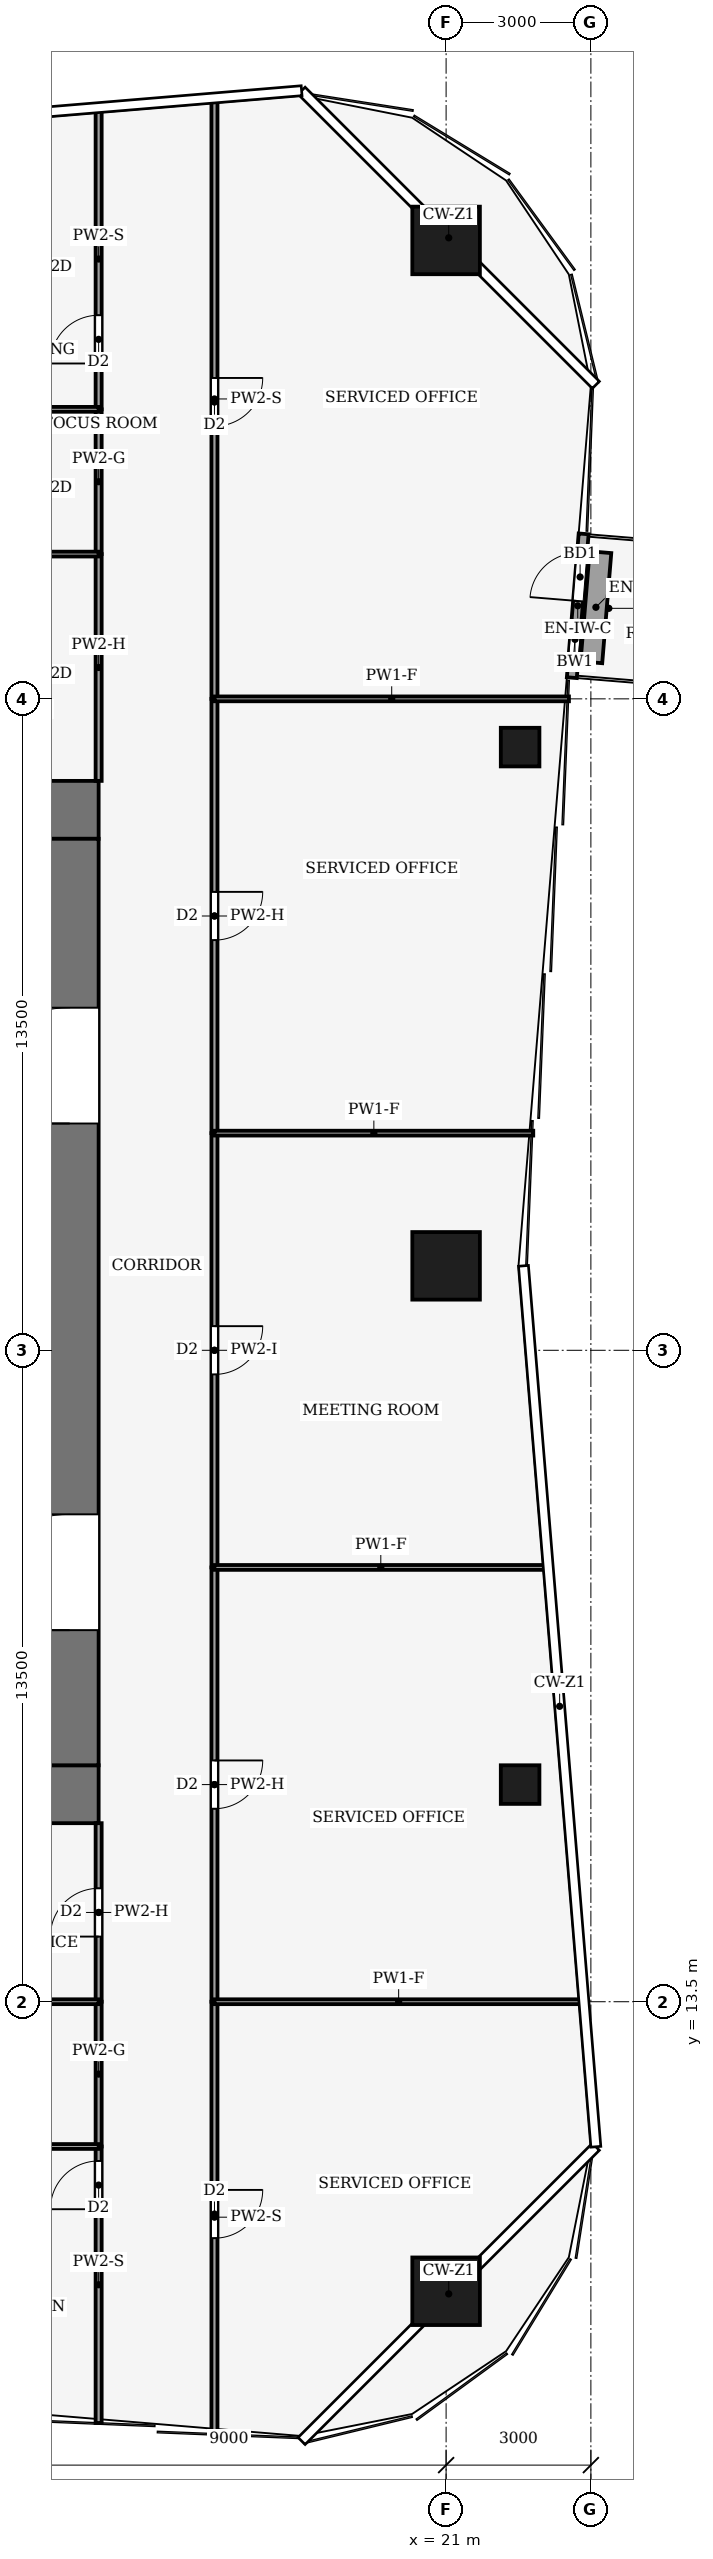
"""IFC4 building model, lengths in metres.
Left out: names, types, materials, properties, quantities, classifications, styles, units other than length and angle.
Written with IfcOpenShell. Run it as: python <this file> out.ifc"""

import sys

from ifc_helpers import new_model, si_unit, direction, frame, frame_2d, origin, origin_2d, place, context, subcontext, project, spatial, rectangle, hollow_rectangle, extrude, element, fill, save


model = new_model("IFC4")
c1 = context("Model", 3, precision=1e-05, world=origin(), true_north=direction((0.0, 1.0)))
c2 = subcontext(c1, "Body", "Model", "MODEL_VIEW")
j1 = project(units=[si_unit("LENGTHUNIT", "METRE"), si_unit("PLANEANGLEUNIT", "RADIAN")], contexts=[c1])
p1 = place(None, origin())
s1 = spatial("IfcSite", under=j1, at=p1, CompositionType="ELEMENT")
p2 = place(p1, origin())
s2 = spatial("IfcBuilding", under=s1, at=p2, CompositionType="ELEMENT")
p3 = place(p2, frame((0.0, 0.0, 98.0)))
s3 = spatial("IfcBuildingStorey", under=s2, at=p3, CompositionType="ELEMENT", Elevation=98.0)
for number, where, z_axis, x_axis in (
    (1, (-13.8, 17.8, -0.13), (0.0, 0.0, 1.0), (1.0, 0.0, 0.0)),
    (2, (-13.8, 38.2, -0.13), (0.0, 0.0, 1.0), (1.0, 0.0, 0.0)),
):
    element("IfcWall", number, at=place(p3, frame(where, z_axis=z_axis, x_axis=x_axis)), inside=s3, PredefinedType="SHEAR", context=c2, shape_type="SweptSolid", body=[
        extrude(rectangle(XDim=27.6, YDim=1.2, at=frame_2d((13.8, 0.0))), origin(), (0.0, 0.0, 1.0), 4.0),
    ])
p4 = place(p3, frame((13.2, 18.4, -0.13), z_axis=(0.0, 0.0, 1.0), x_axis=(0.0, 1.0, 0.0)))
e3 = element("IfcWall", 3, at=p4, inside=s3, PredefinedType="SHEAR", context=c2, shape_type="SweptSolid", body=[
    extrude(rectangle(XDim=19.2, YDim=1.2, at=frame_2d((9.6, 0.0))), origin(), (0.0, 0.0, 1.0), 4.0),
])
p5 = place(p4, frame((2.8, 0.0, 0.13)))
e4 = element("IfcOpeningElement", 4, at=p5, cuts=e3, PredefinedType="OPENING", context=c2, shape_type="SweptSolid", body=[
    extrude(rectangle(XDim=2.4, YDim=2.4, at=frame_2d((1.2, 1.2))), frame((0.0, 0.61, 0.0), z_axis=(0.0, -1.0, 0.0), x_axis=(1.0, 0.0, 0.0)), (0.0, 0.0, 1.0), 1.22),
])
p6 = place(p4, frame((13.3, 0.0, 0.13)))
e5 = element("IfcOpeningElement", 5, at=p6, cuts=e3, PredefinedType="OPENING", context=c2, shape_type="SweptSolid", body=[
    extrude(rectangle(XDim=2.4, YDim=2.4, at=frame_2d((1.2, 1.2))), frame((0.0, 0.61, 0.0), z_axis=(0.0, -1.0, 0.0), x_axis=(1.0, 0.0, 0.0)), (0.0, 0.0, 1.0), 1.22),
])
for number, where, z_axis, x_axis in (
    (6, (21.0, 50.0, 0.0), (0.0, 0.0, 1.0), (1.0, 0.0, 0.0)),
    (7, (21.0, 28.75, 0.0), (0.0, 0.0, 1.0), (1.0, 0.0, 0.0)),
    (8, (21.0, 7.5, 0.0), (0.0, 0.0, 1.0), (1.0, 0.0, 0.0)),
):
    element("IfcColumn", number, at=place(p3, frame(where, z_axis=z_axis, x_axis=x_axis)), inside=s3, PredefinedType="COLUMN", context=c2, shape_type="SweptSolid", body=[
        extrude(hollow_rectangle(XDim=1.4, YDim=1.4, WallThickness=0.08, at=origin_2d()), origin(), (0.0, 0.0, 1.0), 4.0),
    ])
for number, where, z_axis, x_axis in (
    (9, (22.534, 18.0, 0.0), (0.0, 0.0, 1.0), (1.0, 0.0, 0.0)),
    (10, (22.534, 39.5, 0.0), (0.0, 0.0, 1.0), (1.0, 0.0, 0.0)),
):
    element("IfcColumn", number, at=place(p3, frame(where, z_axis=z_axis, x_axis=x_axis)), inside=s3, PredefinedType="COLUMN", context=c2, shape_type="SweptSolid", body=[
        extrude(hollow_rectangle(XDim=0.8, YDim=0.8, WallThickness=0.04, at=origin_2d()), origin(), (0.0, 0.0, 1.0), 4.0),
    ])
p7 = place(p3, frame((23.605, 40.939, 0.0), z_axis=(0.0, 0.0, 1.0), x_axis=(0.081903334605, 0.996640278024, 0.0)))
e11 = element("IfcWall", 11, at=p7, inside=s3, PredefinedType="SOLIDWALL", context=c2, shape_type="SweptSolid", body=[
    extrude(rectangle(XDim=2.99, YDim=0.206, at=frame_2d((1.495, 0.0))), origin(), (0.0, 0.0, 1.0), 3.65),
])
p8 = place(p7, frame((1.593, 0.0, 0.0)))
e12 = element("IfcOpeningElement", 12, at=p8, cuts=e11, PredefinedType="OPENING", context=c2, shape_type="SweptSolid", body=[
    extrude(rectangle(XDim=1.0, YDim=2.1, at=frame_2d((0.5, 1.05))), frame((0.0, 0.113, 0.0), z_axis=(0.0, -1.0, 0.0), x_axis=(1.0, 0.0, 0.0)), (0.0, 0.0, 1.0), 0.226),
])
p9 = place(p7, frame((0.396, 0.0, 0.9)))
e13 = element("IfcOpeningElement", 13, at=p9, cuts=e11, PredefinedType="OPENING", context=c2, shape_type="SweptSolid", body=[
    extrude(rectangle(XDim=0.8, YDim=1.2, at=frame_2d((0.4, 0.6))), frame((0.0, 0.113, 0.0), z_axis=(0.0, -1.0, 0.0), x_axis=(1.0, 0.0, 0.0)), (0.0, 0.0, 1.0), 0.226),
])
p10 = place(p3, frame((24.01, 41.257, 0.0), z_axis=(0.0, 0.0, 1.0), x_axis=(0.081986639556, 0.996633428566, 0.0)))
e14 = element("IfcWall", 14, at=p10, inside=s3, PredefinedType="USERDEFINED", context=c2, shape_type="SweptSolid", body=[
    extrude(rectangle(XDim=2.29, YDim=0.45, at=frame_2d((1.145, 0.0))), origin(), (0.0, 0.0, 1.0), 0.4),
])
p11 = place(p3, frame((16.2, 13.5, 0.0), z_axis=(0.0, 0.0, 1.0), x_axis=(0.0, -1.0, 0.0)))
e15 = element("IfcWall", 15, at=p11, inside=s3, PredefinedType="PARTITIONING", context=c2, shape_type="SweptSolid", body=[
    extrude(rectangle(XDim=8.93, YDim=0.125, at=frame_2d((4.465, 0.0))), origin(), (0.0, 0.0, 1.0), 3.04),
])
p12 = place(p11, frame((3.9, 0.0, 0.0)))
e16 = element("IfcOpeningElement", 16, at=p12, cuts=e15, PredefinedType="OPENING", context=c2, shape_type="SweptSolid", body=[
    extrude(rectangle(XDim=1.0, YDim=2.1, at=frame_2d((0.5, 1.05))), frame((0.0, 0.073, 0.0), z_axis=(0.0, -1.0, 0.0), x_axis=(1.0, 0.0, 0.0)), (0.0, 0.0, 1.0), 0.145),
])
p13 = place(p3, frame((16.2, 22.5, 0.0), z_axis=(0.0, 0.0, 1.0), x_axis=(0.0, -1.0, 0.0)))
e17 = element("IfcWall", 17, at=p13, inside=s3, PredefinedType="PARTITIONING", context=c2, shape_type="SweptSolid", body=[
    extrude(rectangle(XDim=9.0, YDim=0.125, at=frame_2d((4.5, 0.0))), origin(), (0.0, 0.0, 1.0), 3.14),
])
p14 = place(p13, frame((4.0, 0.0, 0.0)))
e18 = element("IfcOpeningElement", 18, at=p14, cuts=e17, PredefinedType="OPENING", context=c2, shape_type="SweptSolid", body=[
    extrude(rectangle(XDim=1.0, YDim=2.1, at=frame_2d((0.5, 1.05))), frame((0.0, 0.073, 0.0), z_axis=(0.0, -1.0, 0.0), x_axis=(1.0, 0.0, 0.0)), (0.0, 0.0, 1.0), 0.145),
])
p15 = place(p3, frame((16.2, 31.5, 0.0), z_axis=(0.0, 0.0, 1.0), x_axis=(0.0, -1.0, 0.0)))
e19 = element("IfcWall", 19, at=p15, inside=s3, PredefinedType="PARTITIONING", context=c2, shape_type="SweptSolid", body=[
    extrude(rectangle(XDim=9.0, YDim=0.125, at=frame_2d((4.5, 0.0))), origin(), (0.0, 0.0, 1.0), 3.48),
])
p16 = place(p15, frame((4.0, 0.0, 0.0)))
e20 = element("IfcOpeningElement", 20, at=p16, cuts=e19, PredefinedType="OPENING", context=c2, shape_type="SweptSolid", body=[
    extrude(rectangle(XDim=1.0, YDim=2.1, at=frame_2d((0.5, 1.05))), frame((0.0, 0.073, 0.0), z_axis=(0.0, -1.0, 0.0), x_axis=(1.0, 0.0, 0.0)), (0.0, 0.0, 1.0), 0.145),
])
p17 = place(p3, frame((16.2, 40.5, 0.0), z_axis=(0.0, 0.0, 1.0), x_axis=(0.0, -1.0, 0.0)))
e21 = element("IfcWall", 21, at=p17, inside=s3, PredefinedType="PARTITIONING", context=c2, shape_type="SweptSolid", body=[
    extrude(rectangle(XDim=9.0, YDim=0.125, at=frame_2d((4.5, 0.0))), origin(), (0.0, 0.0, 1.0), 3.14),
])
p18 = place(p17, frame((4.0, 0.0, 0.0)))
e22 = element("IfcOpeningElement", 22, at=p18, cuts=e21, PredefinedType="OPENING", context=c2, shape_type="SweptSolid", body=[
    extrude(rectangle(XDim=1.0, YDim=2.1, at=frame_2d((0.5, 1.05))), frame((0.0, 0.073, 0.0), z_axis=(0.0, -1.0, 0.0), x_axis=(1.0, 0.0, 0.0)), (0.0, 0.0, 1.0), 0.145),
])
p19 = place(p3, frame((16.2, 52.93, 0.0), z_axis=(0.0, 0.0, 1.0), x_axis=(0.0, -1.0, 0.0)))
e23 = element("IfcWall", 23, at=p19, inside=s3, PredefinedType="PARTITIONING", context=c2, shape_type="SweptSolid", body=[
    extrude(rectangle(XDim=12.43, YDim=0.125, at=frame_2d((6.215, 0.0))), origin(), (0.0, 0.0, 1.0), 3.04),
])
p20 = place(p19, frame((5.78, 0.0, 0.0)))
e24 = element("IfcOpeningElement", 24, at=p20, cuts=e23, PredefinedType="OPENING", context=c2, shape_type="SweptSolid", body=[
    extrude(rectangle(XDim=1.0, YDim=2.1, at=frame_2d((0.5, 1.05))), frame((0.0, 0.073, 0.0), z_axis=(0.0, -1.0, 0.0), x_axis=(1.0, 0.0, 0.0)), (0.0, 0.0, 1.0), 0.145),
])
p21 = place(p3, frame((13.8, 4.77, 0.0), z_axis=(0.0, 0.0, 1.0), x_axis=(0.0, 1.0, 0.0)))
e25 = element("IfcWall", 25, at=p21, inside=s3, PredefinedType="PARTITIONING", context=c2, shape_type="SweptSolid", body=[
    extrude(rectangle(XDim=5.73, YDim=0.125, at=frame_2d((2.865, 0.0))), origin(), (0.0, 0.0, 1.0), 3.04),
])
p22 = place(p21, frame((4.43, 0.0, 0.0)))
e26 = element("IfcOpeningElement", 26, at=p22, cuts=e25, PredefinedType="OPENING", context=c2, shape_type="SweptSolid", body=[
    extrude(rectangle(XDim=1.0, YDim=2.1, at=frame_2d((0.5, 1.05))), frame((0.0, 0.073, 0.0), z_axis=(0.0, -1.0, 0.0), x_axis=(1.0, 0.0, 0.0)), (0.0, 0.0, 1.0), 0.145),
])
p23 = place(p3, frame((13.8, 13.5, 0.0), z_axis=(0.0, 0.0, 1.0), x_axis=(0.0, -1.0, 0.0)))
e27 = element("IfcWall", 27, at=p23, inside=s3, PredefinedType="PARTITIONING", context=c2, shape_type="SweptSolid", body=[
    extrude(rectangle(XDim=3.0, YDim=0.125, at=frame_2d((1.5, 0.0))), origin(), (0.0, 0.0, 1.0), 3.87),
])
p24 = place(p3, frame((13.8, 13.5, 0.0), z_axis=(0.0, 0.0, 1.0), x_axis=(0.0, 1.0, 0.0)))
e28 = element("IfcWall", 28, at=p24, inside=s3, PredefinedType="PARTITIONING", context=c2, shape_type="SweptSolid", body=[
    extrude(rectangle(XDim=3.7, YDim=0.125, at=frame_2d((1.85, 0.0))), origin(), (0.0, 0.0, 1.0), 3.14),
])
p25 = place(p24, frame((1.35, 0.0, 0.0)))
e29 = element("IfcOpeningElement", 29, at=p25, cuts=e28, PredefinedType="OPENING", context=c2, shape_type="SweptSolid", body=[
    extrude(rectangle(XDim=1.0, YDim=2.1, at=frame_2d((0.5, 1.05))), frame((0.0, 0.073, 0.0), z_axis=(0.0, -1.0, 0.0), x_axis=(1.0, 0.0, 0.0)), (0.0, 0.0, 1.0), 0.145),
])
p26 = place(p3, frame((13.8, 43.5, 0.0), z_axis=(0.0, 0.0, 1.0), x_axis=(0.0, -1.0, 0.0)))
e30 = element("IfcWall", 30, at=p26, inside=s3, PredefinedType="PARTITIONING", context=c2, shape_type="SweptSolid", body=[
    extrude(rectangle(XDim=4.7, YDim=0.125, at=frame_2d((2.35, 0.0))), origin(), (0.0, 0.0, 1.0), 3.14),
])
p27 = place(p3, frame((13.8, 46.5, 0.0), z_axis=(0.0, 0.0, 1.0), x_axis=(0.0, -1.0, 0.0)))
e31 = element("IfcWall", 31, at=p27, inside=s3, PredefinedType="PARTITIONING", context=c2, shape_type="SweptSolid", body=[
    extrude(rectangle(XDim=3.0, YDim=0.125, at=frame_2d((1.5, 0.0))), origin(), (0.0, 0.0, 1.0), 3.87),
])
p28 = place(p3, frame((13.8, 46.5, 0.0), z_axis=(0.0, 0.0, 1.0), x_axis=(0.0, 1.0, 0.0)))
e32 = element("IfcWall", 32, at=p28, inside=s3, PredefinedType="PARTITIONING", context=c2, shape_type="SweptSolid", body=[
    extrude(rectangle(XDim=6.23, YDim=0.125, at=frame_2d((3.115, 0.0))), origin(), (0.0, 0.0, 1.0), 3.04),
])
p29 = place(p28, frame((0.95, 0.0, 0.0)))
e33 = element("IfcOpeningElement", 33, at=p29, cuts=e32, PredefinedType="OPENING", context=c2, shape_type="SweptSolid", body=[
    extrude(rectangle(XDim=1.0, YDim=2.1, at=frame_2d((0.5, 1.05))), frame((0.0, 0.073, 0.0), z_axis=(0.0, -1.0, 0.0), x_axis=(1.0, 0.0, 0.0)), (0.0, 0.0, 1.0), 0.145),
])
p30 = place(p3, frame((23.833, 13.5, 0.0), z_axis=(0.0, 0.0, 1.0), x_axis=(-1.0, 0.0, 0.0)))
e34 = element("IfcWall", 34, at=p30, inside=s3, PredefinedType="PARTITIONING", context=c2, shape_type="SweptSolid", body=[
    extrude(rectangle(XDim=7.634, YDim=0.1, at=frame_2d((3.817, 0.0))), origin(), (0.0, 0.0, 1.0), 3.04),
])
p31 = place(p3, frame((23.094, 22.5, 0.0), z_axis=(0.0, 0.0, 1.0), x_axis=(-1.0, 0.0, 0.0)))
e35 = element("IfcWall", 35, at=p31, inside=s3, PredefinedType="PARTITIONING", context=c2, shape_type="SweptSolid", body=[
    extrude(rectangle(XDim=6.894, YDim=0.1, at=frame_2d((3.447, 0.0))), origin(), (0.0, 0.0, 1.0), 3.04),
])
p32 = place(p3, frame((22.806, 31.5, 0.0), z_axis=(0.0, 0.0, 1.0), x_axis=(-1.0, 0.0, 0.0)))
e36 = element("IfcWall", 36, at=p32, inside=s3, PredefinedType="PARTITIONING", context=c2, shape_type="SweptSolid", body=[
    extrude(rectangle(XDim=6.606, YDim=0.1, at=frame_2d((3.303, 0.0))), origin(), (0.0, 0.0, 1.0), 3.04),
])
p33 = place(p3, frame((23.546, 40.5, 0.0), z_axis=(0.0, 0.0, 1.0), x_axis=(-1.0, 0.0, 0.0)))
e37 = element("IfcWall", 37, at=p33, inside=s3, PredefinedType="PARTITIONING", context=c2, shape_type="SweptSolid", body=[
    extrude(rectangle(XDim=7.346, YDim=0.1, at=frame_2d((3.673, 0.0))), origin(), (0.0, 0.0, 1.0), 3.04),
])
p34 = place(p3, frame((7.5, 10.5, 0.0), z_axis=(0.0, 0.0, 1.0), x_axis=(1.0, 0.0, 0.0)))
e38 = element("IfcWall", 38, at=p34, inside=s3, PredefinedType="PARTITIONING", context=c2, shape_type="SweptSolid", body=[
    extrude(rectangle(XDim=6.3, YDim=0.1, at=frame_2d((3.15, 0.0))), origin(), (0.0, 0.0, 1.0), 3.39),
])
p35 = place(p34, frame((2.65, 0.0, 0.0)))
e39 = element("IfcOpeningElement", 39, at=p35, cuts=e38, PredefinedType="OPENING", context=c2, shape_type="SweptSolid", body=[
    extrude(rectangle(XDim=1.0, YDim=2.1, at=frame_2d((0.5, 1.05))), frame((0.0, 0.06, 0.0), z_axis=(0.0, -1.0, 0.0), x_axis=(1.0, 0.0, 0.0)), (0.0, 0.0, 1.0), 0.12),
])
p36 = place(p3, frame((13.8, 13.5, 0.0), z_axis=(0.0, 0.0, 1.0), x_axis=(-1.0, 0.0, 0.0)))
e40 = element("IfcWall", 40, at=p36, inside=s3, PredefinedType="PARTITIONING", context=c2, shape_type="SweptSolid", body=[
    extrude(rectangle(XDim=6.3, YDim=0.1, at=frame_2d((3.15, 0.0))), origin(), (0.0, 0.0, 1.0), 3.39),
])
p37 = place(p3, frame((13.8, 43.5, 0.0), z_axis=(0.0, 0.0, 1.0), x_axis=(-1.0, 0.0, 0.0)))
e41 = element("IfcWall", 41, at=p37, inside=s3, PredefinedType="PARTITIONING", context=c2, shape_type="SweptSolid", body=[
    extrude(rectangle(XDim=3.3, YDim=0.1, at=frame_2d((1.65, 0.0))), origin(), (0.0, 0.0, 1.0), 3.39),
])
p38 = place(p37, frame((1.15, 0.0, 0.0)))
e42 = element("IfcOpeningElement", 42, at=p38, cuts=e41, PredefinedType="OPENING", context=c2, shape_type="SweptSolid", body=[
    extrude(rectangle(XDim=1.0, YDim=2.1, at=frame_2d((0.5, 1.05))), frame((0.0, 0.06, 0.0), z_axis=(0.0, -1.0, 0.0), x_axis=(1.0, 0.0, 0.0)), (0.0, 0.0, 1.0), 0.12),
])
p39 = place(p3, frame((13.8, 46.5, 0.0), z_axis=(0.0, 0.0, 1.0), x_axis=(-1.0, 0.0, 0.0)))
e43 = element("IfcWall", 43, at=p39, inside=s3, PredefinedType="PARTITIONING", context=c2, shape_type="SweptSolid", body=[
    extrude(rectangle(XDim=3.3, YDim=0.1, at=frame_2d((1.65, 0.0))), origin(), (0.0, 0.0, 1.0), 3.39),
])
p40 = place(p39, frame((1.95, 0.0, 0.0)))
e44 = element("IfcOpeningElement", 44, at=p40, cuts=e43, PredefinedType="OPENING", context=c2, shape_type="SweptSolid", body=[
    extrude(rectangle(XDim=1.0, YDim=2.1, at=frame_2d((0.5, 1.05))), frame((0.0, 0.06, 0.0), z_axis=(0.0, -1.0, 0.0), x_axis=(1.0, 0.0, 0.0)), (0.0, 0.0, 1.0), 0.12),
])
p41 = place(p8, origin())
e45 = element("IfcDoor", 45, at=p41, inside=s3, OperationType="SINGLE_SWING_RIGHT", PredefinedType="DOOR", context=c2, shape_type="SweptSolid", body=[
    extrude(rectangle(XDim=1.0, YDim=2.1, at=frame_2d((0.5, 1.05))), frame((0.0, 0.025, 0.0), z_axis=(0.0, -1.0, 0.0), x_axis=(1.0, 0.0, 0.0)), (0.0, 0.0, 1.0), 0.05),
])
fill(e12, e45)
p42 = place(p9, origin())
e46 = element("IfcWindow", 46, at=p42, inside=s3, PartitioningType="SINGLE_PANEL", PredefinedType="WINDOW", context=c2, shape_type="SweptSolid", body=[
    extrude(rectangle(XDim=0.8, YDim=1.2, at=frame_2d((0.4, 0.6))), frame((0.0, 0.03, 0.0), z_axis=(0.0, -1.0, 0.0), x_axis=(1.0, 0.0, 0.0)), (0.0, 0.0, 1.0), 0.06),
])
fill(e13, e46)
p43 = place(p5, origin())
e47 = element("IfcDoor", 47, at=p43, inside=s3, OperationType="DOUBLE_DOOR_SINGLE_SWING", PredefinedType="DOOR", context=c2, shape_type="SweptSolid", body=[
    extrude(rectangle(XDim=2.4, YDim=2.4, at=frame_2d((1.2, 1.2))), frame((0.0, 0.025, 0.0), z_axis=(0.0, -1.0, 0.0), x_axis=(1.0, 0.0, 0.0)), (0.0, 0.0, 1.0), 0.05),
])
fill(e4, e47)
p44 = place(p6, origin())
e48 = element("IfcDoor", 48, at=p44, inside=s3, OperationType="DOUBLE_DOOR_SINGLE_SWING", PredefinedType="DOOR", context=c2, shape_type="SweptSolid", body=[
    extrude(rectangle(XDim=2.4, YDim=2.4, at=frame_2d((1.2, 1.2))), frame((0.0, 0.025, 0.0), z_axis=(0.0, -1.0, 0.0), x_axis=(1.0, 0.0, 0.0)), (0.0, 0.0, 1.0), 0.05),
])
fill(e5, e48)
p45 = place(p12, origin())
e49 = element("IfcDoor", 49, at=p45, inside=s3, OperationType="SINGLE_SWING_LEFT", PredefinedType="DOOR", context=c2, shape_type="SweptSolid", body=[
    extrude(rectangle(XDim=1.0, YDim=2.1, at=frame_2d((0.5, 1.05))), frame((0.0, 0.025, 0.0), z_axis=(0.0, -1.0, 0.0), x_axis=(1.0, 0.0, 0.0)), (0.0, 0.0, 1.0), 0.05),
])
fill(e16, e49)
p46 = place(p14, origin())
e50 = element("IfcDoor", 50, at=p46, inside=s3, OperationType="SINGLE_SWING_RIGHT", PredefinedType="DOOR", context=c2, shape_type="SweptSolid", body=[
    extrude(rectangle(XDim=1.0, YDim=2.1, at=frame_2d((0.5, 1.05))), frame((0.0, 0.025, 0.0), z_axis=(0.0, -1.0, 0.0), x_axis=(1.0, 0.0, 0.0)), (0.0, 0.0, 1.0), 0.05),
])
fill(e18, e50)
p47 = place(p16, origin())
e51 = element("IfcDoor", 51, at=p47, inside=s3, OperationType="SINGLE_SWING_LEFT", PredefinedType="DOOR", context=c2, shape_type="SweptSolid", body=[
    extrude(rectangle(XDim=1.0, YDim=2.1, at=frame_2d((0.5, 1.05))), frame((0.0, 0.025, 0.0), z_axis=(0.0, -1.0, 0.0), x_axis=(1.0, 0.0, 0.0)), (0.0, 0.0, 1.0), 0.05),
])
fill(e20, e51)
p48 = place(p18, origin())
e52 = element("IfcDoor", 52, at=p48, inside=s3, OperationType="SINGLE_SWING_RIGHT", PredefinedType="DOOR", context=c2, shape_type="SweptSolid", body=[
    extrude(rectangle(XDim=1.0, YDim=2.1, at=frame_2d((0.5, 1.05))), frame((0.0, 0.025, 0.0), z_axis=(0.0, -1.0, 0.0), x_axis=(1.0, 0.0, 0.0)), (0.0, 0.0, 1.0), 0.05),
])
fill(e22, e52)
p49 = place(p20, origin())
e53 = element("IfcDoor", 53, at=p49, inside=s3, OperationType="SINGLE_SWING_RIGHT", PredefinedType="DOOR", context=c2, shape_type="SweptSolid", body=[
    extrude(rectangle(XDim=1.0, YDim=2.1, at=frame_2d((0.5, 1.05))), frame((0.0, 0.025, 0.0), z_axis=(0.0, -1.0, 0.0), x_axis=(1.0, 0.0, 0.0)), (0.0, 0.0, 1.0), 0.05),
])
fill(e24, e53)
p50 = place(p22, origin())
e54 = element("IfcDoor", 54, at=p50, inside=s3, OperationType="SINGLE_SWING_RIGHT", PredefinedType="DOOR", context=c2, shape_type="SweptSolid", body=[
    extrude(rectangle(XDim=1.0, YDim=2.1, at=frame_2d((0.5, 1.05))), frame((0.0, 0.025, 0.0), z_axis=(0.0, -1.0, 0.0), x_axis=(1.0, 0.0, 0.0)), (0.0, 0.0, 1.0), 0.05),
])
fill(e26, e54)
p51 = place(p25, origin())
e55 = element("IfcDoor", 55, at=p51, inside=s3, OperationType="SINGLE_SWING_LEFT", PredefinedType="DOOR", context=c2, shape_type="SweptSolid", body=[
    extrude(rectangle(XDim=1.0, YDim=2.1, at=frame_2d((0.5, 1.05))), frame((0.0, 0.025, 0.0), z_axis=(0.0, -1.0, 0.0), x_axis=(1.0, 0.0, 0.0)), (0.0, 0.0, 1.0), 0.05),
])
fill(e29, e55)
p52 = place(p29, origin())
e56 = element("IfcDoor", 56, at=p52, inside=s3, OperationType="SINGLE_SWING_LEFT", PredefinedType="DOOR", context=c2, shape_type="SweptSolid", body=[
    extrude(rectangle(XDim=1.0, YDim=2.1, at=frame_2d((0.5, 1.05))), frame((0.0, 0.025, 0.0), z_axis=(0.0, -1.0, 0.0), x_axis=(1.0, 0.0, 0.0)), (0.0, 0.0, 1.0), 0.05),
])
fill(e33, e56)
save(model, sys.argv[1])
